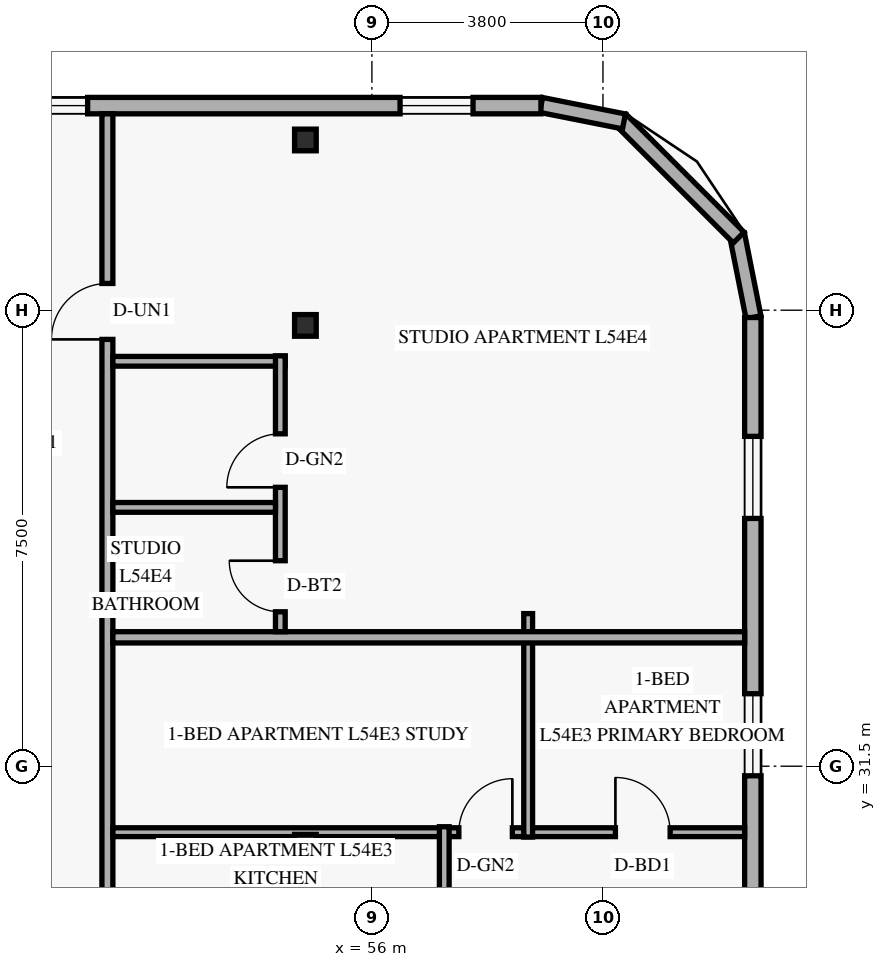
"""IFC4 building model, lengths in metres.
Left out: names, types, materials, properties, quantities, classifications, styles, units other than length and angle.
Written with IfcOpenShell. Run it as: python <this file> out.ifc"""

import sys

from ifc_helpers import new_model, si_unit, direction, frame, frame_2d, origin, origin_2d, place, context, subcontext, project, spatial, rectangle, hollow_rectangle, extrude, element, fill, save


model = new_model("IFC4")
c1 = context("Model", 3, precision=1e-05, world=origin(), true_north=direction((0.0, 1.0)))
c2 = subcontext(c1, "Body", "Model", "MODEL_VIEW")
j1 = project(units=[si_unit("LENGTHUNIT", "METRE"), si_unit("PLANEANGLEUNIT", "RADIAN")], contexts=[c1])
p1 = place(None, origin())
s1 = spatial("IfcSite", under=j1, at=p1, CompositionType="ELEMENT")
p2 = place(p1, origin())
s2 = spatial("IfcBuilding", under=s1, at=p2, CompositionType="ELEMENT")
p3 = place(p2, frame((0.0, 0.0, 209.4)))
s3 = spatial("IfcBuildingStorey", under=s2, at=p3, CompositionType="ELEMENT", Elevation=209.4)
for number, where, z_axis, x_axis in (
    (1, (54.802, 30.2, 0.0), (0.058, 0.0, 0.998), (0.0, 1.0, 0.0)),
    (2, (54.802, 38.75, 0.0), (0.058, 0.0, 0.998), (0.0, 1.0, 0.0)),
    (3, (54.802, 41.8, 0.0), (0.058, 0.0, 0.998), (0.0, 1.0, 0.0)),
):
    element("IfcColumn", number, at=place(p3, frame(where, z_axis=z_axis, x_axis=x_axis)), inside=s3, PredefinedType="COLUMN", context=c2, shape_type="SweptSolid", body=[
        extrude(hollow_rectangle(XDim=0.356, YDim=0.356, WallThickness=0.016, at=origin_2d()), origin(), (0.0, 0.0, 1.0), 3.606),
    ])
p4 = place(p3, frame((62.276, 38.884, 0.0), z_axis=(0.0, 0.0, 1.0), x_axis=(-0.195135625965, 0.9807762678, 0.0)))
e4 = element("IfcWall", 4, at=p4, inside=s3, PredefinedType="SOLIDWALL", context=c2, shape_type="SweptSolid", body=[
    extrude(rectangle(XDim=1.389, YDim=0.25, at=frame_2d((0.694, 0.0))), origin(), (0.0, 0.0, 1.0), 3.36),
])
p5 = place(p3, frame((62.032, 40.195, 0.0), z_axis=(0.0, 0.0, 1.0), x_axis=(-0.707106781187, 0.707106781187, 0.0)))
e5 = element("IfcWall", 5, at=p5, inside=s3, PredefinedType="SOLIDWALL", context=c2, shape_type="SweptSolid", body=[
    extrude(rectangle(XDim=2.739, YDim=0.25, at=frame_2d((1.37, 0.0))), origin(), (0.0, 0.0, 1.0), 3.36),
])
p6 = place(p3, frame((60.146, 42.105, 0.0), z_axis=(0.0, 0.0, 1.0), x_axis=(-0.980809899341, 0.19496651342, 0.0)))
e6 = element("IfcWall", 6, at=p6, inside=s3, PredefinedType="SOLIDWALL", context=c2, shape_type="SweptSolid", body=[
    extrude(rectangle(XDim=1.389, YDim=0.25, at=frame_2d((0.694, 0.0))), origin(), (0.0, 0.0, 1.0), 3.36),
])
p7 = place(p3, frame((62.265, 9.12, 0.0), z_axis=(0.0, 0.0, 1.0), x_axis=(0.0, 1.0, 0.0)))
e7 = element("IfcWall", 7, at=p7, inside=s3, PredefinedType="SOLIDWALL", context=c2, shape_type="SweptSolid", body=[
    extrude(rectangle(XDim=29.76, YDim=0.27, at=frame_2d((14.88, 0.0))), origin(), (0.0, 0.0, 1.0), 3.36),
])
p8 = place(p7, frame((1.955, 0.0, 0.85)))
e8 = element("IfcOpeningElement", 8, at=p8, cuts=e7, PredefinedType="OPENING", context=c2, shape_type="SweptSolid", body=[
    extrude(rectangle(XDim=1.35, YDim=1.55, at=frame_2d((0.675, 0.775))), frame((0.0, 0.145, 0.0), z_axis=(0.0, -1.0, 0.0), x_axis=(1.0, 0.0, 0.0)), (0.0, 0.0, 1.0), 0.29),
])
p9 = place(p7, frame((7.53, 0.0, 0.85)))
e9 = element("IfcOpeningElement", 9, at=p9, cuts=e7, PredefinedType="OPENING", context=c2, shape_type="SweptSolid", body=[
    extrude(rectangle(XDim=1.35, YDim=1.55, at=frame_2d((0.675, 0.775))), frame((0.0, 0.145, 0.0), z_axis=(0.0, -1.0, 0.0), x_axis=(1.0, 0.0, 0.0)), (0.0, 0.0, 1.0), 0.29),
])
p10 = place(p7, frame((12.34, 0.0, 0.85)))
e10 = element("IfcOpeningElement", 10, at=p10, cuts=e7, PredefinedType="OPENING", context=c2, shape_type="SweptSolid", body=[
    extrude(rectangle(XDim=1.35, YDim=1.55, at=frame_2d((0.675, 0.775))), frame((0.0, 0.145, 0.0), z_axis=(0.0, -1.0, 0.0), x_axis=(1.0, 0.0, 0.0)), (0.0, 0.0, 1.0), 0.29),
])
p11 = place(p7, frame((17.412, 0.0, 0.85)))
e11 = element("IfcOpeningElement", 11, at=p11, cuts=e7, PredefinedType="OPENING", context=c2, shape_type="SweptSolid", body=[
    extrude(rectangle(XDim=1.35, YDim=1.55, at=frame_2d((0.675, 0.775))), frame((0.0, 0.145, 0.0), z_axis=(0.0, -1.0, 0.0), x_axis=(1.0, 0.0, 0.0)), (0.0, 0.0, 1.0), 0.29),
])
p12 = place(p7, frame((22.222, 0.0, 0.85)))
e12 = element("IfcOpeningElement", 12, at=p12, cuts=e7, PredefinedType="OPENING", context=c2, shape_type="SweptSolid", body=[
    extrude(rectangle(XDim=1.35, YDim=1.55, at=frame_2d((0.675, 0.775))), frame((0.0, 0.145, 0.0), z_axis=(0.0, -1.0, 0.0), x_axis=(1.0, 0.0, 0.0)), (0.0, 0.0, 1.0), 0.29),
])
p13 = place(p7, frame((26.455, 0.0, 0.85)))
e13 = element("IfcOpeningElement", 13, at=p13, cuts=e7, PredefinedType="OPENING", context=c2, shape_type="SweptSolid", body=[
    extrude(rectangle(XDim=1.35, YDim=1.55, at=frame_2d((0.675, 0.775))), frame((0.0, 0.145, 0.0), z_axis=(0.0, -1.0, 0.0), x_axis=(1.0, 0.0, 0.0)), (0.0, 0.0, 1.0), 0.29),
])
p14 = place(p3, frame((58.78, 42.365, 0.0), z_axis=(0.0, 0.0, 1.0), x_axis=(-1.0, 0.0, 0.0)))
e14 = element("IfcWall", 14, at=p14, inside=s3, PredefinedType="SOLIDWALL", context=c2, shape_type="SweptSolid", body=[
    extrude(rectangle(XDim=32.96, YDim=0.27, at=frame_2d((16.48, 0.0))), origin(), (0.0, 0.0, 1.0), 3.36),
])
p15 = place(p14, frame((27.89, 0.0, 0.85)))
e15 = element("IfcOpeningElement", 15, at=p15, cuts=e14, PredefinedType="OPENING", context=c2, shape_type="SweptSolid", body=[
    extrude(rectangle(XDim=1.2, YDim=1.5, at=frame_2d((0.6, 0.75))), frame((0.0, 0.145, 0.0), z_axis=(0.0, -1.0, 0.0), x_axis=(1.0, 0.0, 0.0)), (0.0, 0.0, 1.0), 0.29),
])
p16 = place(p14, frame((15.486, 0.0, 0.85)))
e16 = element("IfcOpeningElement", 16, at=p16, cuts=e14, PredefinedType="OPENING", context=c2, shape_type="SweptSolid", body=[
    extrude(rectangle(XDim=1.2, YDim=1.5, at=frame_2d((0.6, 0.75))), frame((0.0, 0.145, 0.0), z_axis=(0.0, -1.0, 0.0), x_axis=(1.0, 0.0, 0.0)), (0.0, 0.0, 1.0), 0.29),
])
p17 = place(p14, frame((7.455, 0.0, 0.85)))
e17 = element("IfcOpeningElement", 17, at=p17, cuts=e14, PredefinedType="OPENING", context=c2, shape_type="SweptSolid", body=[
    extrude(rectangle(XDim=1.2, YDim=1.5, at=frame_2d((0.6, 0.75))), frame((0.0, 0.145, 0.0), z_axis=(0.0, -1.0, 0.0), x_axis=(1.0, 0.0, 0.0)), (0.0, 0.0, 1.0), 0.29),
])
p18 = place(p14, frame((1.117, 0.0, 0.85)))
e18 = element("IfcOpeningElement", 18, at=p18, cuts=e14, PredefinedType="OPENING", context=c2, shape_type="SweptSolid", body=[
    extrude(rectangle(XDim=1.2, YDim=1.5, at=frame_2d((0.6, 0.75))), frame((0.0, 0.145, 0.0), z_axis=(0.0, -1.0, 0.0), x_axis=(1.0, 0.0, 0.0)), (0.0, 0.0, 1.0), 0.29),
])
p19 = place(p3, frame((51.65, 5.77, 0.0), z_axis=(0.0, 0.0, 1.0), x_axis=(0.0, 1.0, 0.0)))
e19 = element("IfcWall", 19, at=p19, inside=s3, PredefinedType="STANDARD", context=c2, shape_type="SweptSolid", body=[
    extrude(rectangle(XDim=36.46, YDim=0.18, at=frame_2d((18.23, 0.0))), origin(), (0.0, 0.0, 1.0), 2.803),
])
p20 = place(p19, frame((2.67, 0.0, 0.0)))
e20 = element("IfcOpeningElement", 20, at=p20, cuts=e19, PredefinedType="OPENING", context=c2, shape_type="SweptSolid", body=[
    extrude(rectangle(XDim=0.92, YDim=2.15, at=frame_2d((0.46, 1.075))), frame((0.0, 0.1, 0.0), z_axis=(0.0, -1.0, 0.0), x_axis=(1.0, 0.0, 0.0)), (0.0, 0.0, 1.0), 0.2),
])
p21 = place(p19, frame((13.61, 0.0, 0.0)))
e21 = element("IfcOpeningElement", 21, at=p21, cuts=e19, PredefinedType="OPENING", context=c2, shape_type="SweptSolid", body=[
    extrude(rectangle(XDim=0.92, YDim=2.15, at=frame_2d((0.46, 1.075))), frame((0.0, 0.1, 0.0), z_axis=(0.0, -1.0, 0.0), x_axis=(1.0, 0.0, 0.0)), (0.0, 0.0, 1.0), 0.2),
])
p22 = place(p19, frame((18.76, 0.0, 0.0)))
e22 = element("IfcOpeningElement", 22, at=p22, cuts=e19, PredefinedType="OPENING", context=c2, shape_type="SweptSolid", body=[
    extrude(rectangle(XDim=0.92, YDim=2.15, at=frame_2d((0.46, 1.075))), frame((0.0, 0.1, 0.0), z_axis=(0.0, -1.0, 0.0), x_axis=(1.0, 0.0, 0.0)), (0.0, 0.0, 1.0), 0.2),
])
p23 = place(p19, frame((32.75, 0.0, 0.0)))
e23 = element("IfcOpeningElement", 23, at=p23, cuts=e19, PredefinedType="OPENING", context=c2, shape_type="SweptSolid", body=[
    extrude(rectangle(XDim=0.92, YDim=2.15, at=frame_2d((0.46, 1.075))), frame((0.0, 0.1, 0.0), z_axis=(0.0, -1.0, 0.0), x_axis=(1.0, 0.0, 0.0)), (0.0, 0.0, 1.0), 0.2),
])
p24 = place(p3, frame((51.74, 30.415, 0.0), z_axis=(0.0, 0.0, 1.0), x_axis=(1.0, 0.0, 0.0)))
e24 = element("IfcWall", 24, at=p24, inside=s3, PredefinedType="PARTITIONING", context=c2, shape_type="SweptSolid", body=[
    extrude(rectangle(XDim=10.39, YDim=0.145, at=frame_2d((5.195, 0.0))), origin(), (0.0, 0.0, 1.0), 2.879),
])
p25 = place(p24, frame((5.69, 0.0, 0.0)))
e25 = element("IfcOpeningElement", 25, at=p25, cuts=e24, PredefinedType="OPENING", context=c2, shape_type="SweptSolid", body=[
    extrude(rectangle(XDim=0.88, YDim=2.12, at=frame_2d((0.44, 1.06))), frame((0.0, 0.083, 0.0), z_axis=(0.0, -1.0, 0.0), x_axis=(1.0, 0.0, 0.0)), (0.0, 0.0, 1.0), 0.165),
])
p26 = place(p24, frame((8.265, 0.0, 0.0)))
e26 = element("IfcOpeningElement", 26, at=p26, cuts=e24, PredefinedType="OPENING", context=c2, shape_type="SweptSolid", body=[
    extrude(rectangle(XDim=0.9, YDim=2.14, at=frame_2d((0.45, 1.07))), frame((0.0, 0.083, 0.0), z_axis=(0.0, -1.0, 0.0), x_axis=(1.0, 0.0, 0.0)), (0.0, 0.0, 1.0), 0.165),
])
p27 = place(p3, frame((57.19, 25.74, 0.0), z_axis=(0.0, 0.0, 1.0), x_axis=(0.0, 1.0, 0.0)))
e27 = element("IfcWall", 27, at=p27, inside=s3, PredefinedType="PLUMBINGWALL", context=c2, shape_type="SweptSolid", body=[
    extrude(rectangle(XDim=4.765, YDim=0.16, at=frame_2d((2.382, 0.0))), origin(), (0.0, 0.0, 1.0), 3.36),
])
p28 = place(p27, frame((0.42, 0.0, 0.0)))
e28 = element("IfcOpeningElement", 28, at=p28, cuts=e27, PredefinedType="OPENING", context=c2, shape_type="SweptSolid", body=[
    extrude(rectangle(XDim=0.84, YDim=2.12, at=frame_2d((0.42, 1.06))), frame((0.0, 0.09, 0.0), z_axis=(0.0, -1.0, 0.0), x_axis=(1.0, 0.0, 0.0)), (0.0, 0.0, 1.0), 0.18),
])
p29 = place(p27, frame((2.529, 0.0, 0.0)))
e29 = element("IfcOpeningElement", 29, at=p29, cuts=e27, PredefinedType="OPENING", context=c2, shape_type="SweptSolid", body=[
    extrude(rectangle(XDim=0.88, YDim=2.12, at=frame_2d((0.44, 1.06))), frame((0.0, 0.09, 0.0), z_axis=(0.0, -1.0, 0.0), x_axis=(1.0, 0.0, 0.0)), (0.0, 0.0, 1.0), 0.18),
])
p30 = place(p3, frame((58.57, 30.335, 0.0), z_axis=(0.0, 0.0, 1.0), x_axis=(0.0, 1.0, 0.0)))
e30 = element("IfcWall", 30, at=p30, inside=s3, PredefinedType="PARTITIONING", context=c2, shape_type="SweptSolid", body=[
    extrude(rectangle(XDim=3.675, YDim=0.145, at=frame_2d((1.838, 0.0))), origin(), (0.0, 0.0, 1.0), 3.36),
])
p31 = place(p3, frame((51.74, 33.62, 0.0), z_axis=(0.0, 0.0, 1.0), x_axis=(1.0, 0.0, 0.0)))
e31 = element("IfcWall", 31, at=p31, inside=s3, PredefinedType="PARTITIONING", context=c2, shape_type="SweptSolid", body=[
    extrude(rectangle(XDim=10.39, YDim=0.185, at=frame_2d((5.195, 0.0))), origin(), (0.0, 0.0, 1.0), 2.879),
])
p32 = place(p3, frame((51.74, 38.16, 0.0), z_axis=(0.0, 0.0, 1.0), x_axis=(1.0, 0.0, 0.0)))
e32 = element("IfcWall", 32, at=p32, inside=s3, PredefinedType="PLUMBINGWALL", context=c2, shape_type="SweptSolid", body=[
    extrude(rectangle(XDim=2.834, YDim=0.16, at=frame_2d((1.417, 0.0))), origin(), (0.0, 0.0, 1.0), 3.36),
])
p33 = place(p3, frame((54.494, 33.712, 0.0), z_axis=(0.0, 0.0, 1.0), x_axis=(0.0, 1.0, 0.0)))
e33 = element("IfcWall", 33, at=p33, inside=s3, PredefinedType="PLUMBINGWALL", context=c2, shape_type="SweptSolid", body=[
    extrude(rectangle(XDim=4.538, YDim=0.16, at=frame_2d((2.269, 0.0))), origin(), (0.0, 0.0, 1.0), 3.039),
])
p34 = place(p33, frame((0.327, 0.0, 0.0)))
e34 = element("IfcOpeningElement", 34, at=p34, cuts=e33, PredefinedType="OPENING", context=c2, shape_type="SweptSolid", body=[
    extrude(rectangle(XDim=0.84, YDim=2.12, at=frame_2d((0.42, 1.06))), frame((0.0, 0.09, 0.0), z_axis=(0.0, -1.0, 0.0), x_axis=(1.0, 0.0, 0.0)), (0.0, 0.0, 1.0), 0.18),
])
p35 = place(p33, frame((2.375, 0.0, 0.0)))
e35 = element("IfcOpeningElement", 35, at=p35, cuts=e33, PredefinedType="OPENING", context=c2, shape_type="SweptSolid", body=[
    extrude(rectangle(XDim=0.88, YDim=2.12, at=frame_2d((0.44, 1.06))), frame((0.0, 0.09, 0.0), z_axis=(0.0, -1.0, 0.0), x_axis=(1.0, 0.0, 0.0)), (0.0, 0.0, 1.0), 0.18),
])
p36 = place(p3, frame((51.74, 35.757, 0.0), z_axis=(0.0, 0.0, 1.0), x_axis=(1.0, 0.0, 0.0)))
e36 = element("IfcWall", 36, at=p36, inside=s3, PredefinedType="PLUMBINGWALL", context=c2, shape_type="SweptSolid", body=[
    extrude(rectangle(XDim=2.674, YDim=0.16, at=frame_2d((1.337, 0.0))), origin(), (0.0, 0.0, 1.0), 3.36),
])
p37 = place(p12, origin())
e37 = element("IfcWindow", 37, at=p37, inside=s3, PartitioningType="SINGLE_PANEL", PredefinedType="WINDOW", context=c2, shape_type="SweptSolid", body=[
    extrude(rectangle(XDim=1.35, YDim=1.55, at=frame_2d((0.675, 0.775))), frame((0.0, 0.03, 0.0), z_axis=(0.0, -1.0, 0.0), x_axis=(1.0, 0.0, 0.0)), (0.0, 0.0, 1.0), 0.06),
])
fill(e12, e37)
p38 = place(p13, origin())
e38 = element("IfcWindow", 38, at=p38, inside=s3, PartitioningType="SINGLE_PANEL", PredefinedType="WINDOW", context=c2, shape_type="SweptSolid", body=[
    extrude(rectangle(XDim=1.35, YDim=1.55, at=frame_2d((0.675, 0.775))), frame((0.0, 0.03, 0.0), z_axis=(0.0, -1.0, 0.0), x_axis=(1.0, 0.0, 0.0)), (0.0, 0.0, 1.0), 0.06),
])
fill(e13, e38)
p39 = place(p17, origin())
e39 = element("IfcWindow", 39, at=p39, inside=s3, PartitioningType="SINGLE_PANEL", PredefinedType="WINDOW", context=c2, shape_type="SweptSolid", body=[
    extrude(rectangle(XDim=1.2, YDim=1.5, at=frame_2d((0.6, 0.75))), frame((0.0, 0.03, 0.0), z_axis=(0.0, -1.0, 0.0), x_axis=(1.0, 0.0, 0.0)), (0.0, 0.0, 1.0), 0.06),
])
fill(e17, e39)
p40 = place(p18, origin())
e40 = element("IfcWindow", 40, at=p40, inside=s3, PartitioningType="SINGLE_PANEL", PredefinedType="WINDOW", context=c2, shape_type="SweptSolid", body=[
    extrude(rectangle(XDim=1.2, YDim=1.5, at=frame_2d((0.6, 0.75))), frame((0.0, 0.03, 0.0), z_axis=(0.0, -1.0, 0.0), x_axis=(1.0, 0.0, 0.0)), (0.0, 0.0, 1.0), 0.06),
])
fill(e18, e40)
p41 = place(p25, origin())
e41 = element("IfcDoor", 41, at=p41, inside=s3, OperationType="SINGLE_SWING_RIGHT", PredefinedType="DOOR", context=c2, shape_type="SweptSolid", body=[
    extrude(rectangle(XDim=0.88, YDim=2.12, at=frame_2d((0.44, 1.06))), frame((0.0, 0.025, 0.0), z_axis=(0.0, -1.0, 0.0), x_axis=(1.0, 0.0, 0.0)), (0.0, 0.0, 1.0), 0.05),
])
fill(e25, e41)
p42 = place(p26, origin())
e42 = element("IfcDoor", 42, at=p42, inside=s3, OperationType="SINGLE_SWING_LEFT", PredefinedType="DOOR", context=c2, shape_type="SweptSolid", body=[
    extrude(rectangle(XDim=0.9, YDim=2.14, at=frame_2d((0.45, 1.07))), frame((0.0, 0.025, 0.0), z_axis=(0.0, -1.0, 0.0), x_axis=(1.0, 0.0, 0.0)), (0.0, 0.0, 1.0), 0.05),
])
fill(e26, e42)
p43 = place(p23, origin())
e43 = element("IfcDoor", 43, at=p43, inside=s3, OperationType="SINGLE_SWING_LEFT", PredefinedType="DOOR", context=c2, shape_type="SweptSolid", body=[
    extrude(rectangle(XDim=0.92, YDim=2.15, at=frame_2d((0.46, 1.075))), frame((0.0, 0.025, 0.0), z_axis=(0.0, -1.0, 0.0), x_axis=(1.0, 0.0, 0.0)), (0.0, 0.0, 1.0), 0.05),
])
fill(e23, e43)
p44 = place(p34, origin())
e44 = element("IfcDoor", 44, at=p44, inside=s3, OperationType="SINGLE_SWING_RIGHT", PredefinedType="DOOR", context=c2, shape_type="SweptSolid", body=[
    extrude(rectangle(XDim=0.84, YDim=2.12, at=frame_2d((0.42, 1.06))), frame((0.0, 0.025, 0.0), z_axis=(0.0, -1.0, 0.0), x_axis=(1.0, 0.0, 0.0)), (0.0, 0.0, 1.0), 0.05),
])
fill(e34, e44)
p45 = place(p35, origin())
e45 = element("IfcDoor", 45, at=p45, inside=s3, OperationType="SINGLE_SWING_LEFT", PredefinedType="DOOR", context=c2, shape_type="SweptSolid", body=[
    extrude(rectangle(XDim=0.88, YDim=2.12, at=frame_2d((0.44, 1.06))), frame((0.0, 0.025, 0.0), z_axis=(0.0, -1.0, 0.0), x_axis=(1.0, 0.0, 0.0)), (0.0, 0.0, 1.0), 0.05),
])
fill(e35, e45)
save(model, sys.argv[1])
